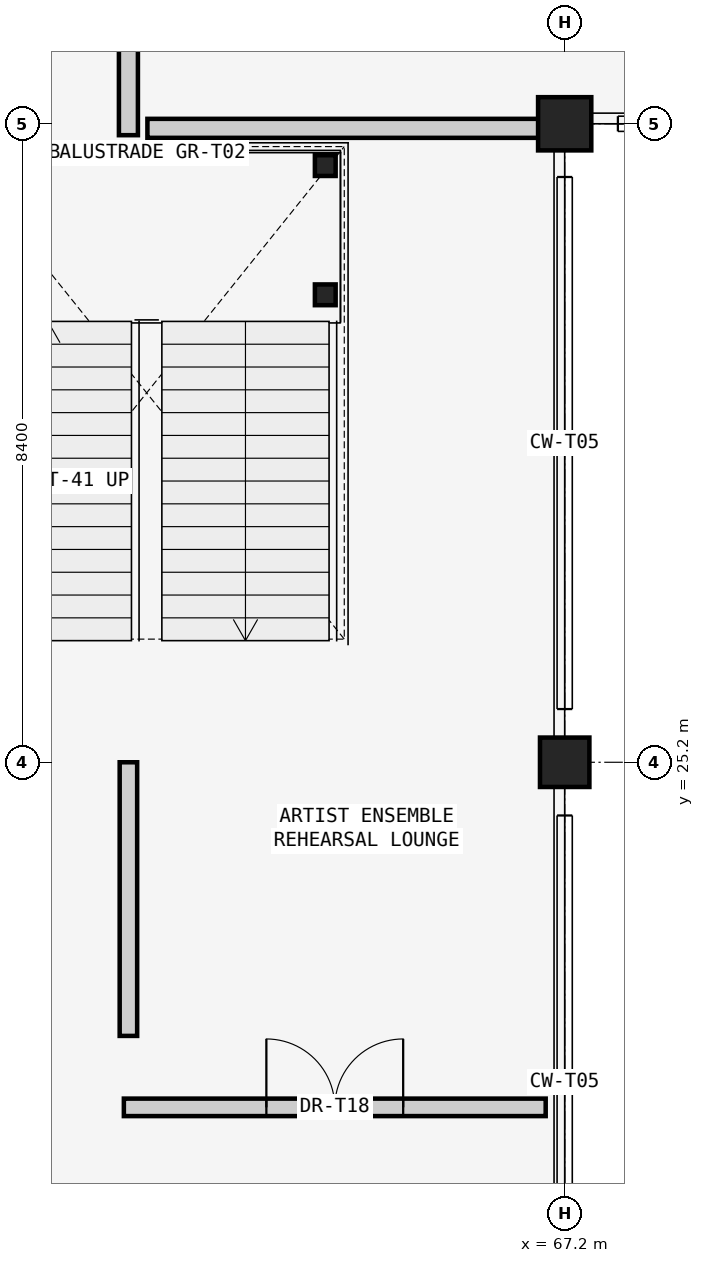
"""IFC4 building model, lengths in metres.
Left out: names, types, materials, properties, quantities, classifications, styles, units other than length and angle.
Written with IfcOpenShell. Run it as: python <this file> out.ifc"""

import sys

from ifc_helpers import new_model, si_unit, direction, frame, frame_2d, origin, origin_2d, place, context, subcontext, project, spatial, rectangle, hollow_circle, extrude, element, fill, save


model = new_model("IFC4")
c1 = context("Model", 3, precision=1e-05, world=origin(), true_north=direction((0.0, 1.0)))
c2 = subcontext(c1, "Body", "Model", "MODEL_VIEW")
j1 = project(units=[si_unit("LENGTHUNIT", "METRE"), si_unit("PLANEANGLEUNIT", "RADIAN")], contexts=[c1])
p1 = place(None, origin())
s1 = spatial("IfcSite", under=j1, at=p1, CompositionType="ELEMENT")
p2 = place(p1, origin())
s2 = spatial("IfcBuilding", under=s1, at=p2, CompositionType="ELEMENT")
p3 = place(p2, frame((0.0, 0.0, 5.4)))
s3 = spatial("IfcBuildingStorey", under=s2, at=p3, CompositionType="ELEMENT", Elevation=5.4)
p4 = place(p3, frame((67.2, 25.2, 0.0), z_axis=(0.0, 0.0, 1.0), x_axis=(1.0, 0.0, 0.0)))
e1 = element("IfcColumn", 1, at=p4, inside=s3, PredefinedType="COLUMN", context=c2, shape_type="SweptSolid", body=[
    extrude(rectangle(XDim=0.65, YDim=0.65, at=origin_2d()), origin(), (0.0, 0.0, 1.0), 4.54),
])
p5 = place(p3, frame((67.2, 33.6, 0.0), z_axis=(0.0, 0.0, 1.0), x_axis=(1.0, 0.0, 0.0)))
e2 = element("IfcColumn", 2, at=p5, inside=s3, PredefinedType="COLUMN", context=c2, shape_type="SweptSolid", body=[
    extrude(rectangle(XDim=0.7, YDim=0.7, at=origin_2d()), origin(), (0.0, 0.0, 1.0), 4.54),
])
for number, where, z_axis, x_axis in (
    (3, (64.05, 31.35, -2.7), (0.0, 0.0, 1.0), (1.0, 0.0, 0.0)),
    (4, (64.05, 33.05, -2.7), (0.0, 0.0, 1.0), (1.0, 0.0, 0.0)),
):
    element("IfcColumn", number, at=place(p3, frame(where, z_axis=z_axis, x_axis=x_axis)), inside=s3, PredefinedType="COLUMN", context=c2, shape_type="SweptSolid", body=[
        extrude(hollow_circle(Radius=0.136, WallThickness=0.011, at=origin_2d()), origin(), (0.0, 0.0, 1.0), 4.86),
    ])
p6 = place(p3, frame((61.46, 33.45, 0.0), z_axis=(0.0, 0.0, 1.0), x_axis=(0.0, 1.0, 0.0)))
e5 = element("IfcWall", 5, at=p6, inside=s3, PredefinedType="SOLIDWALL", context=c2, shape_type="SweptSolid", body=[
    extrude(rectangle(XDim=18.75, YDim=0.25, at=frame_2d((9.375, 0.0))), origin(), (0.0, 0.0, 1.0), 4.48),
])
p7 = place(p6, frame((8.375, 0.0, 0.0)))
e6 = element("IfcOpeningElement", 6, at=p7, cuts=e5, PredefinedType="OPENING", context=c2, shape_type="SweptSolid", body=[
    extrude(rectangle(XDim=2.0, YDim=2.4, at=frame_2d((1.0, 1.2))), frame((0.0, 0.135, 0.0), z_axis=(0.0, -1.0, 0.0), x_axis=(1.0, 0.0, 0.0)), (0.0, 0.0, 1.0), 0.27),
])
p8 = place(p3, frame((61.46, 21.6, 0.0), z_axis=(0.0, 0.0, 1.0), x_axis=(0.0, 1.0, 0.0)))
e7 = element("IfcWall", 7, at=p8, inside=s3, PredefinedType="SOLIDWALL", context=c2, shape_type="SweptSolid", body=[
    extrude(rectangle(XDim=3.6, YDim=0.23, at=frame_2d((1.8, 0.0))), origin(), (0.0, 0.0, 1.0), 4.48),
])
p9 = place(p3, frame((61.4, 20.66, 0.0), z_axis=(0.0, 0.0, 1.0), x_axis=(1.0, 0.0, 0.0)))
e8 = element("IfcWall", 8, at=p9, inside=s3, PredefinedType="SOLIDWALL", context=c2, shape_type="SweptSolid", body=[
    extrude(rectangle(XDim=5.55, YDim=0.23, at=frame_2d((2.775, 0.0))), origin(), (0.0, 0.0, 1.0), 4.48),
])
p10 = place(p9, frame((1.875, 0.0, 0.0)))
e9 = element("IfcOpeningElement", 9, at=p10, cuts=e8, PredefinedType="OPENING", context=c2, shape_type="SweptSolid", body=[
    extrude(rectangle(XDim=1.8, YDim=2.4, at=frame_2d((0.9, 1.2))), frame((0.0, 0.125, 0.0), z_axis=(0.0, -1.0, 0.0), x_axis=(1.0, 0.0, 0.0)), (0.0, 0.0, 1.0), 0.25),
])
p11 = place(p3, frame((61.71, 33.54, 0.0), z_axis=(0.0, 0.0, 1.0), x_axis=(1.0, 0.0, 0.0)))
e10 = element("IfcWall", 10, at=p11, inside=s3, PredefinedType="SOLIDWALL", context=c2, shape_type="SweptSolid", body=[
    extrude(rectangle(XDim=5.27, YDim=0.25, at=frame_2d((2.635, 0.0))), origin(), (0.0, 0.0, 1.0), 3.57),
])
p12 = place(p10, origin())
e11 = element("IfcDoor", 11, at=p12, inside=s3, OperationType="DOUBLE_SWING_LEFT", PredefinedType="DOOR", context=c2, shape_type="SweptSolid", body=[
    extrude(rectangle(XDim=1.8, YDim=2.4, at=frame_2d((0.9, 1.2))), frame((0.0, 0.025, 0.0), z_axis=(0.0, -1.0, 0.0), x_axis=(1.0, 0.0, 0.0)), (0.0, 0.0, 1.0), 0.05),
])
fill(e9, e11)
save(model, sys.argv[1])
